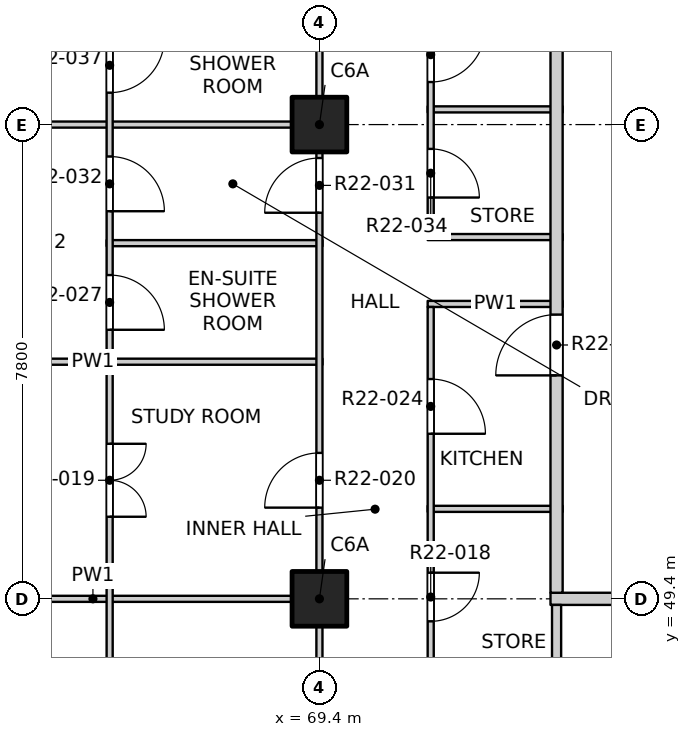
"""IFC4 building model, lengths in metres.
Left out: names, types, materials, properties, quantities, classifications, styles, units other than length and angle.
Written with IfcOpenShell. Run it as: python <this file> out.ifc"""

import sys

from ifc_helpers import new_model, si_unit, direction, frame, frame_2d, origin, origin_2d, place, context, subcontext, project, spatial, rectangle, extrude, element, fill, save


model = new_model("IFC4")
c1 = context("Model", 3, precision=1e-05, world=origin(), true_north=direction((0.0, 1.0)))
c2 = subcontext(c1, "Body", "Model", "MODEL_VIEW")
j1 = project(units=[si_unit("LENGTHUNIT", "METRE"), si_unit("PLANEANGLEUNIT", "RADIAN")], contexts=[c1])
p1 = place(None, origin())
s1 = spatial("IfcSite", under=j1, at=p1, CompositionType="ELEMENT")
p2 = place(p1, origin())
s2 = spatial("IfcBuilding", under=s1, at=p2, CompositionType="ELEMENT")
p3 = place(p2, frame((0.0, 0.0, 231.3)))
s3 = spatial("IfcBuildingStorey", under=s2, at=p3, CompositionType="ELEMENT", Elevation=231.3)
for number, where, z_axis, x_axis in (
    (1, (69.4, 49.4, -0.25), (0.0, 0.0, 1.0), (1.0, 0.0, 0.0)),
    (2, (69.4, 57.2, -0.25), (0.0, 0.0, 1.0), (1.0, 0.0, 0.0)),
):
    element("IfcColumn", number, at=place(p3, frame(where, z_axis=z_axis, x_axis=x_axis)), inside=s3, PredefinedType="COLUMN", context=c2, shape_type="SweptSolid", body=[
        extrude(rectangle(XDim=0.9, YDim=0.9, at=origin_2d()), origin(), (0.0, 0.0, 1.0), 3.4),
    ])
p4 = place(p3, frame((61.9, 49.4, 0.0), z_axis=(0.0, 0.0, 1.0), x_axis=(1.0, 0.0, 0.0)))
e3 = element("IfcWall", 3, at=p4, inside=s3, PredefinedType="PARTITIONING", context=c2, shape_type="SweptSolid", body=[
    extrude(rectangle(XDim=7.55, YDim=0.1, at=frame_2d((3.775, 0.0))), origin(), (0.0, 0.0, 1.0), 3.15),
])
p5 = place(p3, frame((73.2, 49.4, 0.0), z_axis=(0.0, 0.0, 1.0), x_axis=(1.0, 0.0, 0.0)))
e4 = element("IfcWall", 4, at=p5, inside=s3, PredefinedType="PARTITIONING", context=c2, shape_type="SweptSolid", body=[
    extrude(rectangle(XDim=23.6, YDim=0.2, at=frame_2d((11.8, 0.0))), origin(), (0.0, 0.0, 1.0), 3.15),
])
p6 = place(p5, frame((5.35, 0.0, 0.0)))
e5 = element("IfcOpeningElement", 5, at=p6, cuts=e4, PredefinedType="OPENING", context=c2, shape_type="SweptSolid", body=[
    extrude(rectangle(XDim=1.2, YDim=2.1, at=frame_2d((0.6, 1.05))), frame((0.0, 0.11, 0.0), z_axis=(0.0, -1.0, 0.0), x_axis=(1.0, 0.0, 0.0)), (0.0, 0.0, 1.0), 0.22),
])
p7 = place(p5, frame((15.1, 0.0, 0.0)))
e6 = element("IfcOpeningElement", 6, at=p7, cuts=e4, PredefinedType="OPENING", context=c2, shape_type="SweptSolid", body=[
    extrude(rectangle(XDim=1.2, YDim=2.1, at=frame_2d((0.6, 1.05))), frame((0.0, 0.11, 0.0), z_axis=(0.0, -1.0, 0.0), x_axis=(1.0, 0.0, 0.0)), (0.0, 0.0, 1.0), 0.22),
])
p8 = place(p5, frame((21.1, 0.0, 0.0)))
e7 = element("IfcOpeningElement", 7, at=p8, cuts=e4, PredefinedType="OPENING", context=c2, shape_type="SweptSolid", body=[
    extrude(rectangle(XDim=0.9, YDim=2.1, at=frame_2d((0.45, 1.05))), frame((0.0, 0.11, 0.0), z_axis=(0.0, -1.0, 0.0), x_axis=(1.0, 0.0, 0.0)), (0.0, 0.0, 1.0), 0.22),
])
p9 = place(p3, frame((71.18, 50.88, 0.0), z_axis=(0.0, 0.0, 1.0), x_axis=(1.0, 0.0, 0.0)))
e8 = element("IfcWall", 8, at=p9, inside=s3, PredefinedType="PARTITIONING", context=c2, shape_type="SweptSolid", body=[
    extrude(rectangle(XDim=2.22, YDim=0.1, at=frame_2d((1.11, 0.0))), origin(), (0.0, 0.0, 1.0), 3.15),
])
p10 = place(p3, frame((61.9, 53.3, 0.0), z_axis=(0.0, 0.0, 1.0), x_axis=(1.0, 0.0, 0.0)))
e9 = element("IfcWall", 9, at=p10, inside=s3, PredefinedType="PARTITIONING", context=c2, shape_type="SweptSolid", body=[
    extrude(rectangle(XDim=7.55, YDim=0.1, at=frame_2d((3.775, 0.0))), origin(), (0.0, 0.0, 1.0), 3.15),
])
p11 = place(p3, frame((71.18, 54.25, 0.0), z_axis=(0.0, 0.0, 1.0), x_axis=(1.0, 0.0, 0.0)))
e10 = element("IfcWall", 10, at=p11, inside=s3, PredefinedType="PARTITIONING", context=c2, shape_type="SweptSolid", body=[
    extrude(rectangle(XDim=2.22, YDim=0.1, at=frame_2d((1.11, 0.0))), origin(), (0.0, 0.0, 1.0), 3.15),
])
p12 = place(p3, frame((65.9, 55.25, 0.0), z_axis=(0.0, 0.0, 1.0), x_axis=(1.0, 0.0, 0.0)))
e11 = element("IfcWall", 11, at=p12, inside=s3, PredefinedType="PARTITIONING", context=c2, shape_type="SweptSolid", body=[
    extrude(rectangle(XDim=3.55, YDim=0.1, at=frame_2d((1.775, 0.0))), origin(), (0.0, 0.0, 1.0), 3.15),
])
p13 = place(p3, frame((71.18, 55.35, 0.0), z_axis=(0.0, 0.0, 1.0), x_axis=(1.0, 0.0, 0.0)))
e12 = element("IfcWall", 12, at=p13, inside=s3, PredefinedType="PARTITIONING", context=c2, shape_type="SweptSolid", body=[
    extrude(rectangle(XDim=2.22, YDim=0.1, at=frame_2d((1.11, 0.0))), origin(), (0.0, 0.0, 1.0), 3.15),
])
p14 = place(p3, frame((61.9, 57.2, 0.0), z_axis=(0.0, 0.0, 1.0), x_axis=(1.0, 0.0, 0.0)))
e13 = element("IfcWall", 13, at=p14, inside=s3, PredefinedType="PARTITIONING", context=c2, shape_type="SweptSolid", body=[
    extrude(rectangle(XDim=7.55, YDim=0.1, at=frame_2d((3.775, 0.0))), origin(), (0.0, 0.0, 1.0), 3.15),
])
p15 = place(p3, frame((71.18, 57.45, 0.0), z_axis=(0.0, 0.0, 1.0), x_axis=(1.0, 0.0, 0.0)))
e14 = element("IfcWall", 14, at=p15, inside=s3, PredefinedType="PARTITIONING", context=c2, shape_type="SweptSolid", body=[
    extrude(rectangle(XDim=2.22, YDim=0.1, at=frame_2d((1.11, 0.0))), origin(), (0.0, 0.0, 1.0), 3.15),
])
p16 = place(p3, frame((65.95, 41.9, 0.0), z_axis=(0.0, 0.0, 1.0), x_axis=(0.0, 1.0, 0.0)))
e15 = element("IfcWall", 15, at=p16, inside=s3, PredefinedType="PARTITIONING", context=c2, shape_type="SweptSolid", body=[
    extrude(rectangle(XDim=19.1, YDim=0.1, at=frame_2d((9.55, 0.0))), origin(), (0.0, 0.0, 1.0), 3.15),
])
p17 = place(p16, frame((1.05, 0.0, 0.0)))
e16 = element("IfcOpeningElement", 16, at=p17, cuts=e15, PredefinedType="OPENING", context=c2, shape_type="SweptSolid", body=[
    extrude(rectangle(XDim=1.2, YDim=2.1, at=frame_2d((0.6, 1.05))), frame((0.0, 0.06, 0.0), z_axis=(0.0, -1.0, 0.0), x_axis=(1.0, 0.0, 0.0)), (0.0, 0.0, 1.0), 0.12),
])
p18 = place(p16, frame((4.95, 0.0, 0.0)))
e17 = element("IfcOpeningElement", 17, at=p18, cuts=e15, PredefinedType="OPENING", context=c2, shape_type="SweptSolid", body=[
    extrude(rectangle(XDim=1.2, YDim=2.1, at=frame_2d((0.6, 1.05))), frame((0.0, 0.06, 0.0), z_axis=(0.0, -1.0, 0.0), x_axis=(1.0, 0.0, 0.0)), (0.0, 0.0, 1.0), 0.12),
])
p19 = place(p16, frame((8.85, 0.0, 0.0)))
e18 = element("IfcOpeningElement", 18, at=p19, cuts=e15, PredefinedType="OPENING", context=c2, shape_type="SweptSolid", body=[
    extrude(rectangle(XDim=1.2, YDim=2.1, at=frame_2d((0.6, 1.05))), frame((0.0, 0.06, 0.0), z_axis=(0.0, -1.0, 0.0), x_axis=(1.0, 0.0, 0.0)), (0.0, 0.0, 1.0), 0.12),
])
p20 = place(p16, frame((11.925, 0.0, 0.0)))
e19 = element("IfcOpeningElement", 19, at=p20, cuts=e15, PredefinedType="OPENING", context=c2, shape_type="SweptSolid", body=[
    extrude(rectangle(XDim=0.9, YDim=2.1, at=frame_2d((0.45, 1.05))), frame((0.0, 0.06, 0.0), z_axis=(0.0, -1.0, 0.0), x_axis=(1.0, 0.0, 0.0)), (0.0, 0.0, 1.0), 0.12),
])
p21 = place(p16, frame((13.875, 0.0, 0.0)))
e20 = element("IfcOpeningElement", 20, at=p21, cuts=e15, PredefinedType="OPENING", context=c2, shape_type="SweptSolid", body=[
    extrude(rectangle(XDim=0.9, YDim=2.1, at=frame_2d((0.45, 1.05))), frame((0.0, 0.06, 0.0), z_axis=(0.0, -1.0, 0.0), x_axis=(1.0, 0.0, 0.0)), (0.0, 0.0, 1.0), 0.12),
])
p22 = place(p16, frame((15.825, 0.0, 0.0)))
e21 = element("IfcOpeningElement", 21, at=p22, cuts=e15, PredefinedType="OPENING", context=c2, shape_type="SweptSolid", body=[
    extrude(rectangle(XDim=0.9, YDim=2.1, at=frame_2d((0.45, 1.05))), frame((0.0, 0.06, 0.0), z_axis=(0.0, -1.0, 0.0), x_axis=(1.0, 0.0, 0.0)), (0.0, 0.0, 1.0), 0.12),
])
p23 = place(p16, frame((17.775, 0.0, 0.0)))
e22 = element("IfcOpeningElement", 22, at=p23, cuts=e15, PredefinedType="OPENING", context=c2, shape_type="SweptSolid", body=[
    extrude(rectangle(XDim=0.9, YDim=2.1, at=frame_2d((0.45, 1.05))), frame((0.0, 0.06, 0.0), z_axis=(0.0, -1.0, 0.0), x_axis=(1.0, 0.0, 0.0)), (0.0, 0.0, 1.0), 0.12),
])
p24 = place(p3, frame((69.4, 41.9, 0.0), z_axis=(0.0, 0.0, 1.0), x_axis=(0.0, 1.0, 0.0)))
e23 = element("IfcWall", 23, at=p24, inside=s3, PredefinedType="PARTITIONING", context=c2, shape_type="SweptSolid", body=[
    extrude(rectangle(XDim=46.2, YDim=0.1, at=frame_2d((23.1, 0.0))), origin(), (0.0, 0.0, 1.0), 3.15),
])
p25 = place(p24, frame((1.2, 0.0, 0.0)))
e24 = element("IfcOpeningElement", 24, at=p25, cuts=e23, PredefinedType="OPENING", context=c2, shape_type="SweptSolid", body=[
    extrude(rectangle(XDim=0.9, YDim=2.1, at=frame_2d((0.45, 1.05))), frame((0.0, 0.06, 0.0), z_axis=(0.0, -1.0, 0.0), x_axis=(1.0, 0.0, 0.0)), (0.0, 0.0, 1.0), 0.12),
])
p26 = place(p24, frame((5.1, 0.0, 0.0)))
e25 = element("IfcOpeningElement", 25, at=p26, cuts=e23, PredefinedType="OPENING", context=c2, shape_type="SweptSolid", body=[
    extrude(rectangle(XDim=0.9, YDim=2.1, at=frame_2d((0.45, 1.05))), frame((0.0, 0.06, 0.0), z_axis=(0.0, -1.0, 0.0), x_axis=(1.0, 0.0, 0.0)), (0.0, 0.0, 1.0), 0.12),
])
p27 = place(p24, frame((9.0, 0.0, 0.0)))
e26 = element("IfcOpeningElement", 26, at=p27, cuts=e23, PredefinedType="OPENING", context=c2, shape_type="SweptSolid", body=[
    extrude(rectangle(XDim=0.9, YDim=2.1, at=frame_2d((0.45, 1.05))), frame((0.0, 0.06, 0.0), z_axis=(0.0, -1.0, 0.0), x_axis=(1.0, 0.0, 0.0)), (0.0, 0.0, 1.0), 0.12),
])
p28 = place(p24, frame((13.85, 0.0, 0.0)))
e27 = element("IfcOpeningElement", 27, at=p28, cuts=e23, PredefinedType="OPENING", context=c2, shape_type="SweptSolid", body=[
    extrude(rectangle(XDim=0.9, YDim=2.1, at=frame_2d((0.45, 1.05))), frame((0.0, 0.06, 0.0), z_axis=(0.0, -1.0, 0.0), x_axis=(1.0, 0.0, 0.0)), (0.0, 0.0, 1.0), 0.12),
])
p29 = place(p24, frame((17.775, 0.0, 0.0)))
e28 = element("IfcOpeningElement", 28, at=p29, cuts=e23, PredefinedType="OPENING", context=c2, shape_type="SweptSolid", body=[
    extrude(rectangle(XDim=0.9, YDim=2.1, at=frame_2d((0.45, 1.05))), frame((0.0, 0.06, 0.0), z_axis=(0.0, -1.0, 0.0), x_axis=(1.0, 0.0, 0.0)), (0.0, 0.0, 1.0), 0.12),
])
p30 = place(p24, frame((21.625, 0.0, 0.0)))
e29 = element("IfcOpeningElement", 29, at=p30, cuts=e23, PredefinedType="OPENING", context=c2, shape_type="SweptSolid", body=[
    extrude(rectangle(XDim=0.9, YDim=2.1, at=frame_2d((0.45, 1.05))), frame((0.0, 0.06, 0.0), z_axis=(0.0, -1.0, 0.0), x_axis=(1.0, 0.0, 0.0)), (0.0, 0.0, 1.0), 0.12),
])
p31 = place(p24, frame((24.6, 0.0, 0.0)))
e30 = element("IfcOpeningElement", 30, at=p31, cuts=e23, PredefinedType="OPENING", context=c2, shape_type="SweptSolid", body=[
    extrude(rectangle(XDim=0.9, YDim=2.1, at=frame_2d((0.45, 1.05))), frame((0.0, 0.06, 0.0), z_axis=(0.0, -1.0, 0.0), x_axis=(1.0, 0.0, 0.0)), (0.0, 0.0, 1.0), 0.12),
])
p32 = place(p24, frame((29.425, 0.0, 0.0)))
e31 = element("IfcOpeningElement", 31, at=p32, cuts=e23, PredefinedType="OPENING", context=c2, shape_type="SweptSolid", body=[
    extrude(rectangle(XDim=0.9, YDim=2.1, at=frame_2d((0.45, 1.05))), frame((0.0, 0.06, 0.0), z_axis=(0.0, -1.0, 0.0), x_axis=(1.0, 0.0, 0.0)), (0.0, 0.0, 1.0), 0.12),
])
p33 = place(p24, frame((33.375, 0.0, 0.0)))
e32 = element("IfcOpeningElement", 32, at=p33, cuts=e23, PredefinedType="OPENING", context=c2, shape_type="SweptSolid", body=[
    extrude(rectangle(XDim=0.9, YDim=2.1, at=frame_2d((0.45, 1.05))), frame((0.0, 0.06, 0.0), z_axis=(0.0, -1.0, 0.0), x_axis=(1.0, 0.0, 0.0)), (0.0, 0.0, 1.0), 0.12),
])
p34 = place(p24, frame((36.3, 0.0, 0.0)))
e33 = element("IfcOpeningElement", 33, at=p34, cuts=e23, PredefinedType="OPENING", context=c2, shape_type="SweptSolid", body=[
    extrude(rectangle(XDim=0.9, YDim=2.1, at=frame_2d((0.45, 1.05))), frame((0.0, 0.06, 0.0), z_axis=(0.0, -1.0, 0.0), x_axis=(1.0, 0.0, 0.0)), (0.0, 0.0, 1.0), 0.12),
])
p35 = place(p24, frame((41.175, 0.0, 0.0)))
e34 = element("IfcOpeningElement", 34, at=p35, cuts=e23, PredefinedType="OPENING", context=c2, shape_type="SweptSolid", body=[
    extrude(rectangle(XDim=0.9, YDim=2.1, at=frame_2d((0.45, 1.05))), frame((0.0, 0.06, 0.0), z_axis=(0.0, -1.0, 0.0), x_axis=(1.0, 0.0, 0.0)), (0.0, 0.0, 1.0), 0.12),
])
p36 = place(p24, frame((44.1, 0.0, 0.0)))
e35 = element("IfcOpeningElement", 35, at=p36, cuts=e23, PredefinedType="OPENING", context=c2, shape_type="SweptSolid", body=[
    extrude(rectangle(XDim=0.9, YDim=2.1, at=frame_2d((0.45, 1.05))), frame((0.0, 0.06, 0.0), z_axis=(0.0, -1.0, 0.0), x_axis=(1.0, 0.0, 0.0)), (0.0, 0.0, 1.0), 0.12),
])
p37 = place(p3, frame((71.23, 45.55, 0.0), z_axis=(0.0, 0.0, 1.0), x_axis=(0.0, 1.0, 0.0)))
e36 = element("IfcWall", 36, at=p37, inside=s3, PredefinedType="PARTITIONING", context=c2, shape_type="SweptSolid", body=[
    extrude(rectangle(XDim=8.65, YDim=0.1, at=frame_2d((4.325, 0.0))), origin(), (0.0, 0.0, 1.0), 3.15),
])
p38 = place(p37, frame((0.74, 0.0, 0.0)))
e37 = element("IfcOpeningElement", 37, at=p38, cuts=e36, PredefinedType="OPENING", context=c2, shape_type="SweptSolid", body=[
    extrude(rectangle(XDim=0.9, YDim=2.1, at=frame_2d((0.45, 1.05))), frame((0.0, 0.06, 0.0), z_axis=(0.0, -1.0, 0.0), x_axis=(1.0, 0.0, 0.0)), (0.0, 0.0, 1.0), 0.12),
])
p39 = place(p37, frame((3.48, 0.0, 0.0)))
e38 = element("IfcOpeningElement", 38, at=p39, cuts=e36, PredefinedType="OPENING", context=c2, shape_type="SweptSolid", body=[
    extrude(rectangle(XDim=0.8, YDim=2.1, at=frame_2d((0.4, 1.05))), frame((0.0, 0.06, 0.0), z_axis=(0.0, -1.0, 0.0), x_axis=(1.0, 0.0, 0.0)), (0.0, 0.0, 1.0), 0.12),
])
p40 = place(p37, frame((6.565, 0.0, 0.0)))
e39 = element("IfcOpeningElement", 39, at=p40, cuts=e36, PredefinedType="OPENING", context=c2, shape_type="SweptSolid", body=[
    extrude(rectangle(XDim=0.9, YDim=2.1, at=frame_2d((0.45, 1.05))), frame((0.0, 0.06, 0.0), z_axis=(0.0, -1.0, 0.0), x_axis=(1.0, 0.0, 0.0)), (0.0, 0.0, 1.0), 0.12),
])
p41 = place(p3, frame((71.23, 55.4, 0.0), z_axis=(0.0, 0.0, 1.0), x_axis=(0.0, 1.0, 0.0)))
e40 = element("IfcWall", 40, at=p41, inside=s3, PredefinedType="PARTITIONING", context=c2, shape_type="SweptSolid", body=[
    extrude(rectangle(XDim=10.85, YDim=0.1, at=frame_2d((5.425, 0.0))), origin(), (0.0, 0.0, 1.0), 3.15),
])
p42 = place(p41, frame((0.6, 0.0, 0.0)))
e41 = element("IfcOpeningElement", 41, at=p42, cuts=e40, PredefinedType="OPENING", context=c2, shape_type="SweptSolid", body=[
    extrude(rectangle(XDim=0.8, YDim=2.1, at=frame_2d((0.4, 1.05))), frame((0.0, 0.06, 0.0), z_axis=(0.0, -1.0, 0.0), x_axis=(1.0, 0.0, 0.0)), (0.0, 0.0, 1.0), 0.12),
])
p43 = place(p41, frame((2.5, 0.0, 0.0)))
e42 = element("IfcOpeningElement", 42, at=p43, cuts=e40, PredefinedType="OPENING", context=c2, shape_type="SweptSolid", body=[
    extrude(rectangle(XDim=0.9, YDim=2.1, at=frame_2d((0.45, 1.05))), frame((0.0, 0.06, 0.0), z_axis=(0.0, -1.0, 0.0), x_axis=(1.0, 0.0, 0.0)), (0.0, 0.0, 1.0), 0.12),
])
p44 = place(p41, frame((4.375, 0.0, 0.0)))
e43 = element("IfcOpeningElement", 43, at=p44, cuts=e40, PredefinedType="OPENING", context=c2, shape_type="SweptSolid", body=[
    extrude(rectangle(XDim=0.8, YDim=2.1, at=frame_2d((0.4, 1.05))), frame((0.0, 0.06, 0.0), z_axis=(0.0, -1.0, 0.0), x_axis=(1.0, 0.0, 0.0)), (0.0, 0.0, 1.0), 0.12),
])
p45 = place(p41, frame((6.935, 0.0, 0.0)))
e44 = element("IfcOpeningElement", 44, at=p45, cuts=e40, PredefinedType="OPENING", context=c2, shape_type="SweptSolid", body=[
    extrude(rectangle(XDim=0.9, YDim=2.1, at=frame_2d((0.45, 1.05))), frame((0.0, 0.06, 0.0), z_axis=(0.0, -1.0, 0.0), x_axis=(1.0, 0.0, 0.0)), (0.0, 0.0, 1.0), 0.12),
])
p46 = place(p41, frame((9.535, 0.0, 0.0)))
e45 = element("IfcOpeningElement", 45, at=p46, cuts=e40, PredefinedType="OPENING", context=c2, shape_type="SweptSolid", body=[
    extrude(rectangle(XDim=0.9, YDim=2.1, at=frame_2d((0.45, 1.05))), frame((0.0, 0.06, 0.0), z_axis=(0.0, -1.0, 0.0), x_axis=(1.0, 0.0, 0.0)), (0.0, 0.0, 1.0), 0.12),
])
p47 = place(p3, frame((73.3, 41.9, 0.0), z_axis=(0.0, 0.0, 1.0), x_axis=(0.0, 1.0, 0.0)))
e46 = element("IfcWall", 46, at=p47, inside=s3, PredefinedType="PARTITIONING", context=c2, shape_type="SweptSolid", body=[
    extrude(rectangle(XDim=7.4, YDim=0.15, at=frame_2d((3.7, 0.0))), origin(), (0.0, 0.0, 1.0), 3.15),
])
p48 = place(p3, frame((73.3, 49.5, 0.0), z_axis=(0.0, 0.0, 1.0), x_axis=(0.0, 1.0, 0.0)))
e47 = element("IfcWall", 47, at=p48, inside=s3, PredefinedType="PARTITIONING", context=c2, shape_type="SweptSolid", body=[
    extrude(rectangle(XDim=34.9, YDim=0.2, at=frame_2d((17.45, 0.0))), origin(), (0.0, 0.0, 1.0), 3.15),
])
p49 = place(p48, frame((3.575, 0.0, 0.0)))
e48 = element("IfcOpeningElement", 48, at=p49, cuts=e47, PredefinedType="OPENING", context=c2, shape_type="SweptSolid", body=[
    extrude(rectangle(XDim=1.0, YDim=2.1, at=frame_2d((0.5, 1.05))), frame((0.0, 0.11, 0.0), z_axis=(0.0, -1.0, 0.0), x_axis=(1.0, 0.0, 0.0)), (0.0, 0.0, 1.0), 0.22),
])
p50 = place(p48, frame((18.075, 0.0, 0.0)))
e49 = element("IfcOpeningElement", 49, at=p50, cuts=e47, PredefinedType="OPENING", context=c2, shape_type="SweptSolid", body=[
    extrude(rectangle(XDim=1.0, YDim=2.1, at=frame_2d((0.5, 1.05))), frame((0.0, 0.11, 0.0), z_axis=(0.0, -1.0, 0.0), x_axis=(1.0, 0.0, 0.0)), (0.0, 0.0, 1.0), 0.22),
])
p51 = place(p48, frame((26.175, 0.0, 0.0)))
e50 = element("IfcOpeningElement", 50, at=p51, cuts=e47, PredefinedType="OPENING", context=c2, shape_type="SweptSolid", body=[
    extrude(rectangle(XDim=1.0, YDim=2.1, at=frame_2d((0.5, 1.05))), frame((0.0, 0.11, 0.0), z_axis=(0.0, -1.0, 0.0), x_axis=(1.0, 0.0, 0.0)), (0.0, 0.0, 1.0), 0.22),
])
p52 = place(p39, origin())
e51 = element("IfcDoor", 51, at=p52, inside=s3, OperationType="SINGLE_SWING_LEFT", PredefinedType="DOOR", context=c2, shape_type="SweptSolid", body=[
    extrude(rectangle(XDim=0.8, YDim=2.1, at=frame_2d((0.4, 1.05))), frame((0.0, 0.025, 0.0), z_axis=(0.0, -1.0, 0.0), x_axis=(1.0, 0.0, 0.0)), (0.0, 0.0, 1.0), 0.05),
])
fill(e38, e51)
p53 = place(p19, origin())
e52 = element("IfcDoor", 52, at=p53, inside=s3, OperationType="DOUBLE_DOOR_SINGLE_SWING", PredefinedType="DOOR", context=c2, shape_type="SweptSolid", body=[
    extrude(rectangle(XDim=1.2, YDim=2.1, at=frame_2d((0.6, 1.05))), frame((0.0, 0.025, 0.0), z_axis=(0.0, -1.0, 0.0), x_axis=(1.0, 0.0, 0.0)), (0.0, 0.0, 1.0), 0.05),
])
fill(e18, e52)
p54 = place(p27, origin())
e53 = element("IfcDoor", 53, at=p54, inside=s3, OperationType="SINGLE_SWING_LEFT", PredefinedType="DOOR", context=c2, shape_type="SweptSolid", body=[
    extrude(rectangle(XDim=0.9, YDim=2.1, at=frame_2d((0.45, 1.05))), frame((0.0, 0.025, 0.0), z_axis=(0.0, -1.0, 0.0), x_axis=(1.0, 0.0, 0.0)), (0.0, 0.0, 1.0), 0.05),
])
fill(e26, e53)
p55 = place(p40, origin())
e54 = element("IfcDoor", 54, at=p55, inside=s3, OperationType="SINGLE_SWING_RIGHT", PredefinedType="DOOR", context=c2, shape_type="SweptSolid", body=[
    extrude(rectangle(XDim=0.9, YDim=2.1, at=frame_2d((0.45, 1.05))), frame((0.0, 0.025, 0.0), z_axis=(0.0, -1.0, 0.0), x_axis=(1.0, 0.0, 0.0)), (0.0, 0.0, 1.0), 0.05),
])
fill(e39, e54)
p56 = place(p49, origin())
e55 = element("IfcDoor", 55, at=p56, inside=s3, OperationType="SINGLE_SWING_LEFT", PredefinedType="DOOR", context=c2, shape_type="SweptSolid", body=[
    extrude(rectangle(XDim=1.0, YDim=2.1, at=frame_2d((0.5, 1.05))), frame((0.0, 0.025, 0.0), z_axis=(0.0, -1.0, 0.0), x_axis=(1.0, 0.0, 0.0)), (0.0, 0.0, 1.0), 0.05),
])
fill(e48, e55)
p57 = place(p20, origin())
e56 = element("IfcDoor", 56, at=p57, inside=s3, OperationType="SINGLE_SWING_RIGHT", PredefinedType="DOOR", context=c2, shape_type="SweptSolid", body=[
    extrude(rectangle(XDim=0.9, YDim=2.1, at=frame_2d((0.45, 1.05))), frame((0.0, 0.025, 0.0), z_axis=(0.0, -1.0, 0.0), x_axis=(1.0, 0.0, 0.0)), (0.0, 0.0, 1.0), 0.05),
])
fill(e19, e56)
p58 = place(p28, origin())
e57 = element("IfcDoor", 57, at=p58, inside=s3, OperationType="SINGLE_SWING_LEFT", PredefinedType="DOOR", context=c2, shape_type="SweptSolid", body=[
    extrude(rectangle(XDim=0.9, YDim=2.1, at=frame_2d((0.45, 1.05))), frame((0.0, 0.025, 0.0), z_axis=(0.0, -1.0, 0.0), x_axis=(1.0, 0.0, 0.0)), (0.0, 0.0, 1.0), 0.05),
])
fill(e27, e57)
p59 = place(p21, origin())
e58 = element("IfcDoor", 58, at=p59, inside=s3, OperationType="SINGLE_SWING_RIGHT", PredefinedType="DOOR", context=c2, shape_type="SweptSolid", body=[
    extrude(rectangle(XDim=0.9, YDim=2.1, at=frame_2d((0.45, 1.05))), frame((0.0, 0.025, 0.0), z_axis=(0.0, -1.0, 0.0), x_axis=(1.0, 0.0, 0.0)), (0.0, 0.0, 1.0), 0.05),
])
fill(e20, e58)
p60 = place(p42, origin())
e59 = element("IfcDoor", 59, at=p60, inside=s3, OperationType="SINGLE_SWING_RIGHT", PredefinedType="DOOR", context=c2, shape_type="SweptSolid", body=[
    extrude(rectangle(XDim=0.8, YDim=2.1, at=frame_2d((0.4, 1.05))), frame((0.0, 0.025, 0.0), z_axis=(0.0, -1.0, 0.0), x_axis=(1.0, 0.0, 0.0)), (0.0, 0.0, 1.0), 0.05),
])
fill(e41, e59)
p61 = place(p22, origin())
e60 = element("IfcDoor", 60, at=p61, inside=s3, OperationType="SINGLE_SWING_LEFT", PredefinedType="DOOR", context=c2, shape_type="SweptSolid", body=[
    extrude(rectangle(XDim=0.9, YDim=2.1, at=frame_2d((0.45, 1.05))), frame((0.0, 0.025, 0.0), z_axis=(0.0, -1.0, 0.0), x_axis=(1.0, 0.0, 0.0)), (0.0, 0.0, 1.0), 0.05),
])
fill(e21, e60)
p62 = place(p43, origin())
e61 = element("IfcDoor", 61, at=p62, inside=s3, OperationType="SINGLE_SWING_LEFT", PredefinedType="DOOR", context=c2, shape_type="SweptSolid", body=[
    extrude(rectangle(XDim=0.9, YDim=2.1, at=frame_2d((0.45, 1.05))), frame((0.0, 0.025, 0.0), z_axis=(0.0, -1.0, 0.0), x_axis=(1.0, 0.0, 0.0)), (0.0, 0.0, 1.0), 0.05),
])
fill(e42, e61)
save(model, sys.argv[1])
